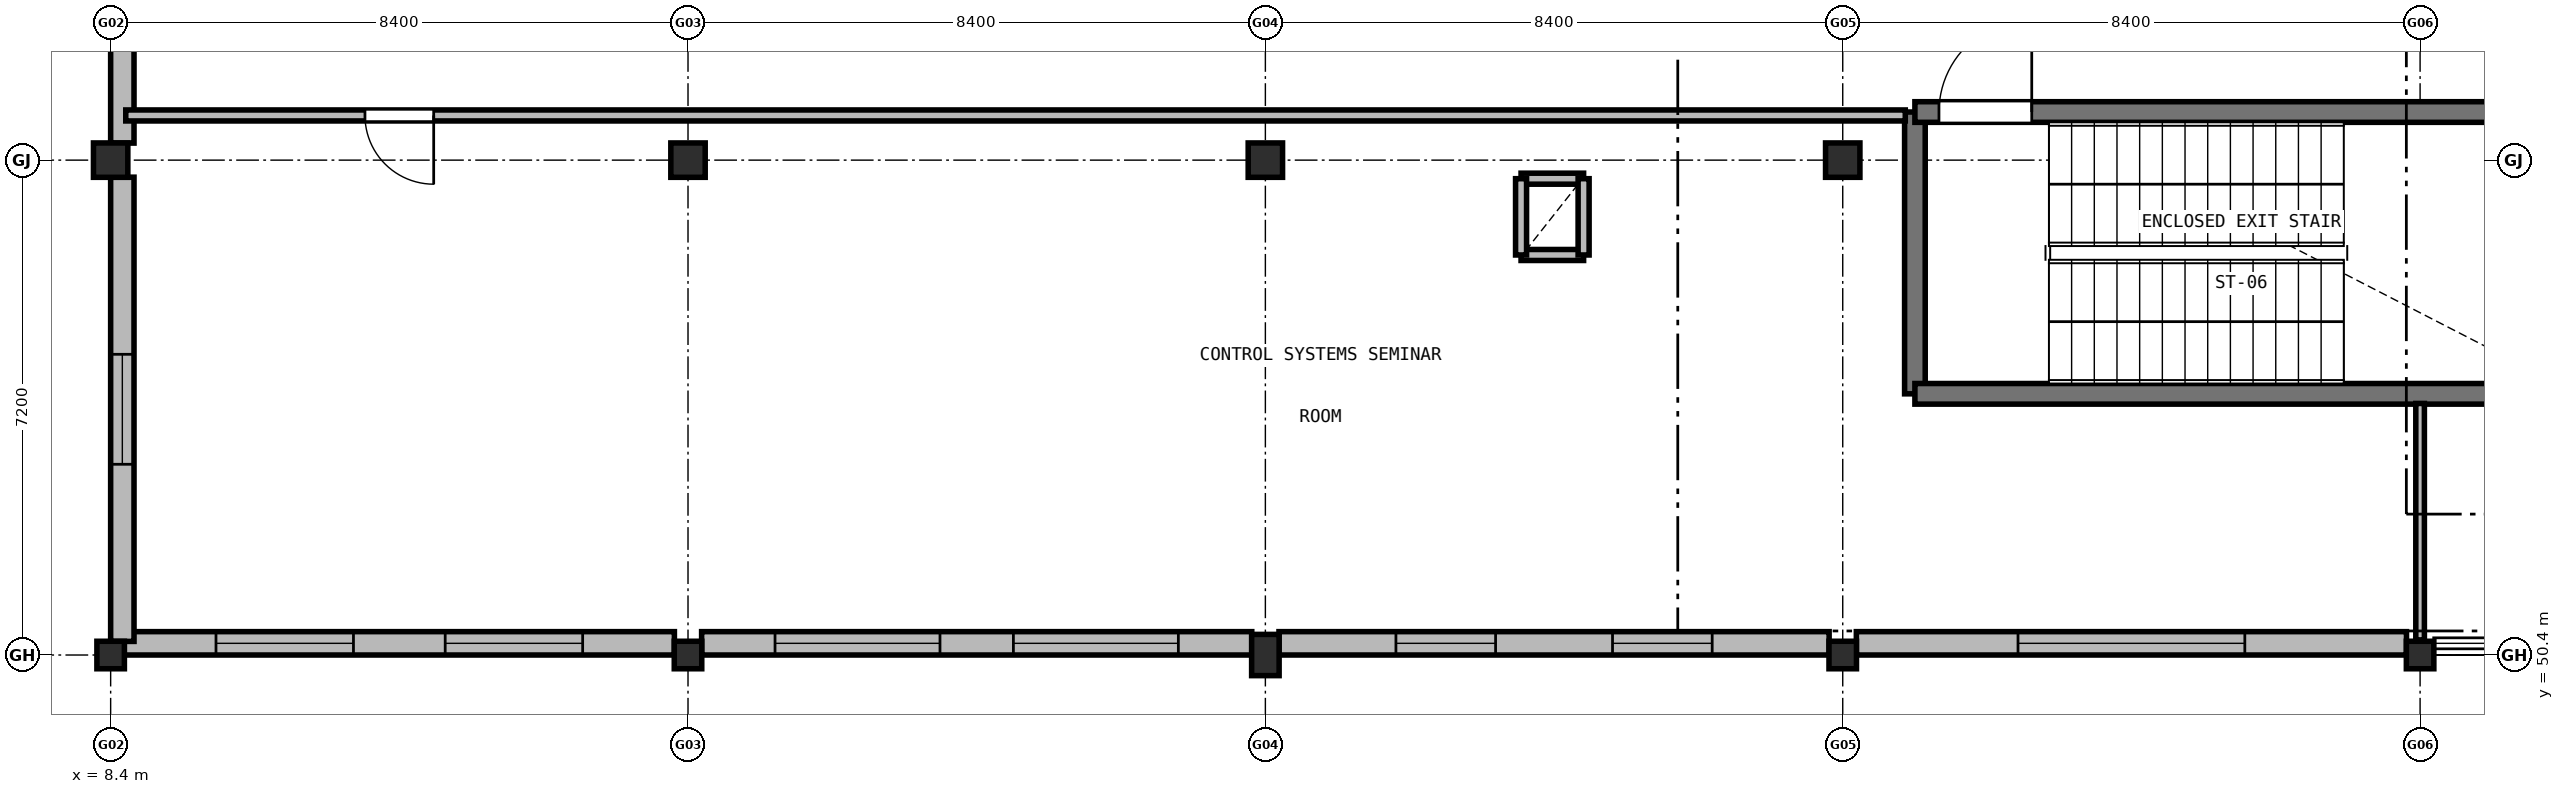
"""IFC4 building model, lengths in metres.
Left out: names, types, materials, properties, quantities, classifications, styles, units other than length and angle.
Written with IfcOpenShell. Run it as: python <this file> out.ifc"""

import sys

from ifc_helpers import new_model, si_unit, direction, frame, frame_2d, origin, origin_2d, place, context, subcontext, project, spatial, rectangle, extrude, element, fill, save


model = new_model("IFC4")
c1 = context("Model", 3, precision=1e-05, world=origin(), true_north=direction((0.0, 1.0)))
c2 = subcontext(c1, "Body", "Model", "MODEL_VIEW")
j1 = project(units=[si_unit("LENGTHUNIT", "METRE"), si_unit("PLANEANGLEUNIT", "RADIAN")], contexts=[c1])
p1 = place(None, origin())
s1 = spatial("IfcSite", under=j1, at=p1, CompositionType="ELEMENT")
p2 = place(p1, origin())
s2 = spatial("IfcBuilding", under=s1, at=p2, CompositionType="ELEMENT")
p3 = place(p2, frame((0.0, 0.0, 9.3)))
s3 = spatial("IfcBuildingStorey", under=s2, at=p3, CompositionType="ELEMENT", Elevation=9.3)
p4 = place(p3, frame((8.4, 50.4, 0.0), z_axis=(0.0, 0.0, 1.0), x_axis=(1.0, 0.0, 0.0)))
e1 = element("IfcColumn", 1, at=p4, inside=s3, PredefinedType="COLUMN", context=c2, shape_type="SweptSolid", body=[
    extrude(rectangle(XDim=0.4, YDim=0.4, at=origin_2d()), origin(), (0.0, 0.0, 1.0), 4.2),
])
p5 = place(p3, frame((8.4, 57.6, 0.0), z_axis=(0.0, 0.0, 1.0), x_axis=(1.0, 0.0, 0.0)))
e2 = element("IfcColumn", 2, at=p5, inside=s3, PredefinedType="COLUMN", context=c2, shape_type="SweptSolid", body=[
    extrude(rectangle(XDim=0.5, YDim=0.5, at=origin_2d()), origin(), (0.0, 0.0, 1.0), 4.2),
])
p6 = place(p3, frame((16.8, 50.4, 0.0), z_axis=(0.0, 0.0, 1.0), x_axis=(1.0, 0.0, 0.0)))
e3 = element("IfcColumn", 3, at=p6, inside=s3, PredefinedType="COLUMN", context=c2, shape_type="SweptSolid", body=[
    extrude(rectangle(XDim=0.4, YDim=0.4, at=origin_2d()), origin(), (0.0, 0.0, 1.0), 4.2),
])
p7 = place(p3, frame((16.8, 57.6, 0.0), z_axis=(0.0, 0.0, 1.0), x_axis=(1.0, 0.0, 0.0)))
e4 = element("IfcColumn", 4, at=p7, inside=s3, PredefinedType="COLUMN", context=c2, shape_type="SweptSolid", body=[
    extrude(rectangle(XDim=0.5, YDim=0.5, at=origin_2d()), origin(), (0.0, 0.0, 1.0), 4.2),
])
p8 = place(p3, frame((25.2, 50.4, 0.0), z_axis=(0.0, 0.0, 1.0), x_axis=(1.0, 0.0, 0.0)))
e5 = element("IfcColumn", 5, at=p8, inside=s3, PredefinedType="COLUMN", context=c2, shape_type="SweptSolid", body=[
    extrude(rectangle(XDim=0.4, YDim=0.6, at=origin_2d()), origin(), (0.0, 0.0, 1.0), 4.2),
])
p9 = place(p3, frame((25.2, 57.6, 0.0), z_axis=(0.0, 0.0, 1.0), x_axis=(1.0, 0.0, 0.0)))
e6 = element("IfcColumn", 6, at=p9, inside=s3, PredefinedType="COLUMN", context=c2, shape_type="SweptSolid", body=[
    extrude(rectangle(XDim=0.5, YDim=0.5, at=origin_2d()), origin(), (0.0, 0.0, 1.0), 4.2),
])
p10 = place(p3, frame((33.6, 50.4, 0.0), z_axis=(0.0, 0.0, 1.0), x_axis=(1.0, 0.0, 0.0)))
e7 = element("IfcColumn", 7, at=p10, inside=s3, PredefinedType="COLUMN", context=c2, shape_type="SweptSolid", body=[
    extrude(rectangle(XDim=0.4, YDim=0.4, at=origin_2d()), origin(), (0.0, 0.0, 1.0), 4.2),
])
p11 = place(p3, frame((33.6, 57.6, 0.0), z_axis=(0.0, 0.0, 1.0), x_axis=(1.0, 0.0, 0.0)))
e8 = element("IfcColumn", 8, at=p11, inside=s3, PredefinedType="COLUMN", context=c2, shape_type="SweptSolid", body=[
    extrude(rectangle(XDim=0.5, YDim=0.5, at=origin_2d()), origin(), (0.0, 0.0, 1.0), 4.2),
])
p12 = place(p3, frame((42.0, 50.4, 0.0), z_axis=(0.0, 0.0, 1.0), x_axis=(1.0, 0.0, 0.0)))
e9 = element("IfcColumn", 9, at=p12, inside=s3, PredefinedType="COLUMN", context=c2, shape_type="SweptSolid", body=[
    extrude(rectangle(XDim=0.4, YDim=0.4, at=origin_2d()), origin(), (0.0, 0.0, 1.0), 4.2),
])
p13 = place(p3, frame((41.802, 50.57, 0.0), z_axis=(0.0, 0.0, 1.0), x_axis=(-1.0, 0.0, 0.0)))
e10 = element("IfcWall", 10, at=p13, inside=s3, PredefinedType="SOLIDWALL", context=c2, shape_type="SweptSolid", body=[
    extrude(rectangle(XDim=8.004, YDim=0.34, at=frame_2d((4.002, 0.0))), origin(), (0.0, 0.0, 1.0), 3.18),
])
p14 = place(p13, frame((2.352, 0.0, 0.95)))
e11 = element("IfcOpeningElement", 11, at=p14, cuts=e10, PredefinedType="OPENING", context=c2, shape_type="SweptSolid", body=[
    extrude(rectangle(XDim=3.3, YDim=1.65, at=frame_2d((1.65, 0.825))), frame((0.0, 0.18, 0.0), z_axis=(0.0, -1.0, 0.0), x_axis=(1.0, 0.0, 0.0)), (0.0, 0.0, 1.0), 0.36),
])
p15 = place(p3, frame((33.402, 50.57, 0.0), z_axis=(0.0, 0.0, 1.0), x_axis=(-1.0, 0.0, 0.0)))
e12 = element("IfcWall", 12, at=p15, inside=s3, PredefinedType="SOLIDWALL", context=c2, shape_type="SweptSolid", body=[
    extrude(rectangle(XDim=8.004, YDim=0.34, at=frame_2d((4.002, 0.0))), origin(), (0.0, 0.0, 1.0), 3.18),
])
p16 = place(p15, frame((1.701, 0.0, 0.95)))
e13 = element("IfcOpeningElement", 13, at=p16, cuts=e12, PredefinedType="OPENING", context=c2, shape_type="SweptSolid", body=[
    extrude(rectangle(XDim=1.45, YDim=1.85, at=frame_2d((0.725, 0.925))), frame((0.0, 0.18, 0.0), z_axis=(0.0, -1.0, 0.0), x_axis=(1.0, 0.0, 0.0)), (0.0, 0.0, 1.0), 0.36),
])
p17 = place(p15, frame((4.853, 0.0, 0.95)))
e14 = element("IfcOpeningElement", 14, at=p17, cuts=e12, PredefinedType="OPENING", context=c2, shape_type="SweptSolid", body=[
    extrude(rectangle(XDim=1.45, YDim=1.85, at=frame_2d((0.725, 0.925))), frame((0.0, 0.18, 0.0), z_axis=(0.0, -1.0, 0.0), x_axis=(1.0, 0.0, 0.0)), (0.0, 0.0, 1.0), 0.36),
])
p18 = place(p3, frame((25.002, 50.57, 0.0), z_axis=(0.0, 0.0, 1.0), x_axis=(-1.0, 0.0, 0.0)))
e15 = element("IfcWall", 15, at=p18, inside=s3, PredefinedType="SOLIDWALL", context=c2, shape_type="SweptSolid", body=[
    extrude(rectangle(XDim=8.004, YDim=0.34, at=frame_2d((4.002, 0.0))), origin(), (0.0, 0.0, 1.0), 3.18),
])
p19 = place(p18, frame((1.068, 0.0, 0.95)))
e16 = element("IfcOpeningElement", 16, at=p19, cuts=e15, PredefinedType="OPENING", context=c2, shape_type="SweptSolid", body=[
    extrude(rectangle(XDim=2.4, YDim=1.98, at=frame_2d((1.2, 0.99))), frame((0.0, 0.18, 0.0), z_axis=(0.0, -1.0, 0.0), x_axis=(1.0, 0.0, 0.0)), (0.0, 0.0, 1.0), 0.36),
])
p20 = place(p18, frame((4.536, 0.0, 0.95)))
e17 = element("IfcOpeningElement", 17, at=p20, cuts=e15, PredefinedType="OPENING", context=c2, shape_type="SweptSolid", body=[
    extrude(rectangle(XDim=2.4, YDim=1.98, at=frame_2d((1.2, 0.99))), frame((0.0, 0.18, 0.0), z_axis=(0.0, -1.0, 0.0), x_axis=(1.0, 0.0, 0.0)), (0.0, 0.0, 1.0), 0.36),
])
p21 = place(p3, frame((16.602, 50.57, 0.0), z_axis=(0.0, 0.0, 1.0), x_axis=(-1.0, 0.0, 0.0)))
e18 = element("IfcWall", 18, at=p21, inside=s3, PredefinedType="SOLIDWALL", context=c2, shape_type="SweptSolid", body=[
    extrude(rectangle(XDim=8.004, YDim=0.34, at=frame_2d((4.002, 0.0))), origin(), (0.0, 0.0, 1.0), 3.18),
])
p22 = place(p21, frame((1.335, 0.0, 0.95)))
e19 = element("IfcOpeningElement", 19, at=p22, cuts=e18, PredefinedType="OPENING", context=c2, shape_type="SweptSolid", body=[
    extrude(rectangle(XDim=2.0, YDim=1.98, at=frame_2d((1.0, 0.99))), frame((0.0, 0.18, 0.0), z_axis=(0.0, -1.0, 0.0), x_axis=(1.0, 0.0, 0.0)), (0.0, 0.0, 1.0), 0.36),
])
p23 = place(p21, frame((4.669, 0.0, 0.95)))
e20 = element("IfcOpeningElement", 20, at=p23, cuts=e18, PredefinedType="OPENING", context=c2, shape_type="SweptSolid", body=[
    extrude(rectangle(XDim=2.0, YDim=1.98, at=frame_2d((1.0, 0.99))), frame((0.0, 0.18, 0.0), z_axis=(0.0, -1.0, 0.0), x_axis=(1.0, 0.0, 0.0)), (0.0, 0.0, 1.0), 0.36),
])
p24 = place(p3, frame((8.57, 50.598, 0.0), z_axis=(0.0, 0.0, 1.0), x_axis=(0.0, 1.0, 0.0)))
e21 = element("IfcWall", 21, at=p24, inside=s3, PredefinedType="SOLIDWALL", context=c2, shape_type="SweptSolid", body=[
    extrude(rectangle(XDim=6.754, YDim=0.34, at=frame_2d((3.377, 0.0))), origin(), (0.0, 0.0, 1.0), 3.33),
])
p25 = place(p24, frame((2.577, 0.0, 0.95)))
e22 = element("IfcOpeningElement", 22, at=p25, cuts=e21, PredefinedType="OPENING", context=c2, shape_type="SweptSolid", body=[
    extrude(rectangle(XDim=1.6, YDim=1.9, at=frame_2d((0.8, 0.95))), frame((0.0, 0.18, 0.0), z_axis=(0.0, -1.0, 0.0), x_axis=(1.0, 0.0, 0.0)), (0.0, 0.0, 1.0), 0.36),
])
p26 = place(p3, frame((8.57, 57.848, 0.0), z_axis=(0.0, 0.0, 1.0), x_axis=(0.0, 1.0, 0.0)))
e23 = element("IfcWall", 23, at=p26, inside=s3, PredefinedType="SOLIDWALL", context=c2, shape_type="SweptSolid", body=[
    extrude(rectangle(XDim=6.704, YDim=0.34, at=frame_2d((3.352, 0.0))), origin(), (0.0, 0.0, 1.0), 3.33),
])
p27 = place(p3, frame((34.65, 54.2, 0.0), z_axis=(0.0, 0.0, 1.0), x_axis=(0.0, 1.0, 0.0)))
e24 = element("IfcWall", 24, at=p27, inside=s3, PredefinedType="SHEAR", context=c2, shape_type="SweptSolid", body=[
    extrude(rectangle(XDim=4.1, YDim=0.3, at=frame_2d((2.05, 0.0))), origin(), (0.0, 0.0, 1.0), 3.94),
])
p28 = place(p3, frame((34.65, 58.3, 0.0), z_axis=(0.0, 0.0, 1.0), x_axis=(1.0, 0.0, 0.0)))
e25 = element("IfcWall", 25, at=p28, inside=s3, PredefinedType="SHEAR", context=c2, shape_type="SweptSolid", body=[
    extrude(rectangle(XDim=9.5, YDim=0.3, at=frame_2d((4.75, 0.0))), origin(), (0.0, 0.0, 1.0), 3.94),
])
p29 = place(p28, frame((0.35, 0.0, 0.0)))
e26 = element("IfcOpeningElement", 26, at=p29, cuts=e25, PredefinedType="OPENING", context=c2, shape_type="SweptSolid", body=[
    extrude(rectangle(XDim=1.35, YDim=2.2, at=frame_2d((0.675, 1.1))), frame((0.0, 0.16, 0.0), z_axis=(0.0, -1.0, 0.0), x_axis=(1.0, 0.0, 0.0)), (0.0, 0.0, 1.0), 0.32),
])
p30 = place(p3, frame((44.15, 54.2, 0.0), z_axis=(0.0, 0.0, 1.0), x_axis=(-1.0, 0.0, 0.0)))
e27 = element("IfcWall", 27, at=p30, inside=s3, PredefinedType="SHEAR", context=c2, shape_type="SweptSolid", body=[
    extrude(rectangle(XDim=9.5, YDim=0.3, at=frame_2d((4.75, 0.0))), origin(), (0.0, 0.0, 1.0), 3.94),
])
p31 = place(p3, frame((28.92, 56.22, 0.0), z_axis=(0.0, 0.0, 1.0), x_axis=(1.0, 0.0, 0.0)))
e28 = element("IfcWall", 28, at=p31, inside=s3, PredefinedType="PARTITIONING", context=c2, shape_type="SweptSolid", body=[
    extrude(rectangle(XDim=0.91, YDim=0.16, at=frame_2d((0.455, 0.0))), origin(), (0.0, 0.0, 1.0), 3.65),
])
p32 = place(p3, frame((29.83, 57.33, 0.0), z_axis=(0.0, 0.0, 1.0), x_axis=(-1.0, 0.0, 0.0)))
e29 = element("IfcWall", 29, at=p32, inside=s3, PredefinedType="PARTITIONING", context=c2, shape_type="SweptSolid", body=[
    extrude(rectangle(XDim=0.91, YDim=0.16, at=frame_2d((0.455, 0.0))), origin(), (0.0, 0.0, 1.0), 3.175),
])
for number, where, z_axis, x_axis in (
    (30, (28.92, 57.33, 0.0), (0.0, 0.0, 1.0), (0.0, -1.0, 0.0)),
    (31, (29.83, 56.22, 0.0), (0.0, 0.0, 1.0), (0.0, 1.0, 0.0)),
):
    element("IfcWall", number, at=place(p3, frame(where, z_axis=z_axis, x_axis=x_axis)), inside=s3, PredefinedType="PARTITIONING", context=c2, shape_type="SweptSolid", body=[
        extrude(rectangle(XDim=1.11, YDim=0.16, at=frame_2d((0.555, 0.0))), origin(), (0.0, 0.0, 1.0), 3.175),
    ])
p33 = place(p3, frame((34.51, 58.25, 0.0), z_axis=(0.0, 0.0, 1.0), x_axis=(-1.0, 0.0, 0.0)))
e32 = element("IfcWall", 32, at=p33, inside=s3, PredefinedType="PARTITIONING", context=c2, shape_type="SweptSolid", body=[
    extrude(rectangle(XDim=25.89, YDim=0.16, at=frame_2d((12.945, 0.0))), origin(), (0.0, 0.0, 1.0), 3.325),
])
p34 = place(p33, frame((21.41, 0.0, 0.0)))
e33 = element("IfcOpeningElement", 33, at=p34, cuts=e32, PredefinedType="OPENING", context=c2, shape_type="SweptSolid", body=[
    extrude(rectangle(XDim=1.0, YDim=2.1, at=frame_2d((0.5, 1.05))), frame((0.0, 0.09, 0.0), z_axis=(0.0, -1.0, 0.0), x_axis=(1.0, 0.0, 0.0)), (0.0, 0.0, 1.0), 0.18),
])
p35 = place(p3, frame((42.0, 50.62, 0.0), z_axis=(0.0, 0.0, 1.0), x_axis=(0.0, 1.0, 0.0)))
e34 = element("IfcWall", 34, at=p35, inside=s3, PredefinedType="PARTITIONING", context=c2, shape_type="SweptSolid", body=[
    extrude(rectangle(XDim=3.44, YDim=0.125, at=frame_2d((1.72, 0.0))), origin(), (0.0, 0.0, 1.0), 3.175),
])
p36 = place(p14, origin())
e35 = element("IfcWindow", 35, at=p36, inside=s3, PartitioningType="SINGLE_PANEL", PredefinedType="WINDOW", context=c2, shape_type="SweptSolid", body=[
    extrude(rectangle(XDim=3.3, YDim=1.65, at=frame_2d((1.65, 0.825))), frame((0.0, 0.03, 0.0), z_axis=(0.0, -1.0, 0.0), x_axis=(1.0, 0.0, 0.0)), (0.0, 0.0, 1.0), 0.06),
])
fill(e11, e35)
p37 = place(p16, origin())
e36 = element("IfcWindow", 36, at=p37, inside=s3, PartitioningType="SINGLE_PANEL", PredefinedType="WINDOW", context=c2, shape_type="SweptSolid", body=[
    extrude(rectangle(XDim=1.45, YDim=1.85, at=frame_2d((0.725, 0.925))), frame((0.0, 0.03, 0.0), z_axis=(0.0, -1.0, 0.0), x_axis=(1.0, 0.0, 0.0)), (0.0, 0.0, 1.0), 0.06),
])
fill(e13, e36)
p38 = place(p17, origin())
e37 = element("IfcWindow", 37, at=p38, inside=s3, PartitioningType="SINGLE_PANEL", PredefinedType="WINDOW", context=c2, shape_type="SweptSolid", body=[
    extrude(rectangle(XDim=1.45, YDim=1.85, at=frame_2d((0.725, 0.925))), frame((0.0, 0.03, 0.0), z_axis=(0.0, -1.0, 0.0), x_axis=(1.0, 0.0, 0.0)), (0.0, 0.0, 1.0), 0.06),
])
fill(e14, e37)
p39 = place(p19, origin())
e38 = element("IfcWindow", 38, at=p39, inside=s3, PartitioningType="SINGLE_PANEL", PredefinedType="WINDOW", context=c2, shape_type="SweptSolid", body=[
    extrude(rectangle(XDim=2.4, YDim=1.98, at=frame_2d((1.2, 0.99))), frame((0.0, 0.03, 0.0), z_axis=(0.0, -1.0, 0.0), x_axis=(1.0, 0.0, 0.0)), (0.0, 0.0, 1.0), 0.06),
])
fill(e16, e38)
p40 = place(p20, origin())
e39 = element("IfcWindow", 39, at=p40, inside=s3, PartitioningType="SINGLE_PANEL", PredefinedType="WINDOW", context=c2, shape_type="SweptSolid", body=[
    extrude(rectangle(XDim=2.4, YDim=1.98, at=frame_2d((1.2, 0.99))), frame((0.0, 0.03, 0.0), z_axis=(0.0, -1.0, 0.0), x_axis=(1.0, 0.0, 0.0)), (0.0, 0.0, 1.0), 0.06),
])
fill(e17, e39)
p41 = place(p22, origin())
e40 = element("IfcWindow", 40, at=p41, inside=s3, PartitioningType="SINGLE_PANEL", PredefinedType="WINDOW", context=c2, shape_type="SweptSolid", body=[
    extrude(rectangle(XDim=2.0, YDim=1.98, at=frame_2d((1.0, 0.99))), frame((0.0, 0.03, 0.0), z_axis=(0.0, -1.0, 0.0), x_axis=(1.0, 0.0, 0.0)), (0.0, 0.0, 1.0), 0.06),
])
fill(e19, e40)
p42 = place(p23, origin())
e41 = element("IfcWindow", 41, at=p42, inside=s3, PartitioningType="SINGLE_PANEL", PredefinedType="WINDOW", context=c2, shape_type="SweptSolid", body=[
    extrude(rectangle(XDim=2.0, YDim=1.98, at=frame_2d((1.0, 0.99))), frame((0.0, 0.03, 0.0), z_axis=(0.0, -1.0, 0.0), x_axis=(1.0, 0.0, 0.0)), (0.0, 0.0, 1.0), 0.06),
])
fill(e20, e41)
p43 = place(p25, origin())
e42 = element("IfcWindow", 42, at=p43, inside=s3, PartitioningType="SINGLE_PANEL", PredefinedType="WINDOW", context=c2, shape_type="SweptSolid", body=[
    extrude(rectangle(XDim=1.6, YDim=1.9, at=frame_2d((0.8, 0.95))), frame((0.0, 0.03, 0.0), z_axis=(0.0, -1.0, 0.0), x_axis=(1.0, 0.0, 0.0)), (0.0, 0.0, 1.0), 0.06),
])
fill(e22, e42)
p44 = place(p29, origin())
e43 = element("IfcDoor", 43, at=p44, inside=s3, OperationType="SINGLE_SWING_RIGHT", PredefinedType="DOOR", context=c2, shape_type="SweptSolid", body=[
    extrude(rectangle(XDim=1.35, YDim=2.2, at=frame_2d((0.675, 1.1))), frame((0.0, 0.025, 0.0), z_axis=(0.0, -1.0, 0.0), x_axis=(1.0, 0.0, 0.0)), (0.0, 0.0, 1.0), 0.05),
])
fill(e26, e43)
p45 = place(p34, origin())
e44 = element("IfcDoor", 44, at=p45, inside=s3, OperationType="SINGLE_SWING_LEFT", PredefinedType="DOOR", context=c2, shape_type="SweptSolid", body=[
    extrude(rectangle(XDim=1.0, YDim=2.1, at=frame_2d((0.5, 1.05))), frame((0.0, 0.025, 0.0), z_axis=(0.0, -1.0, 0.0), x_axis=(1.0, 0.0, 0.0)), (0.0, 0.0, 1.0), 0.05),
])
fill(e33, e44)
save(model, sys.argv[1])
